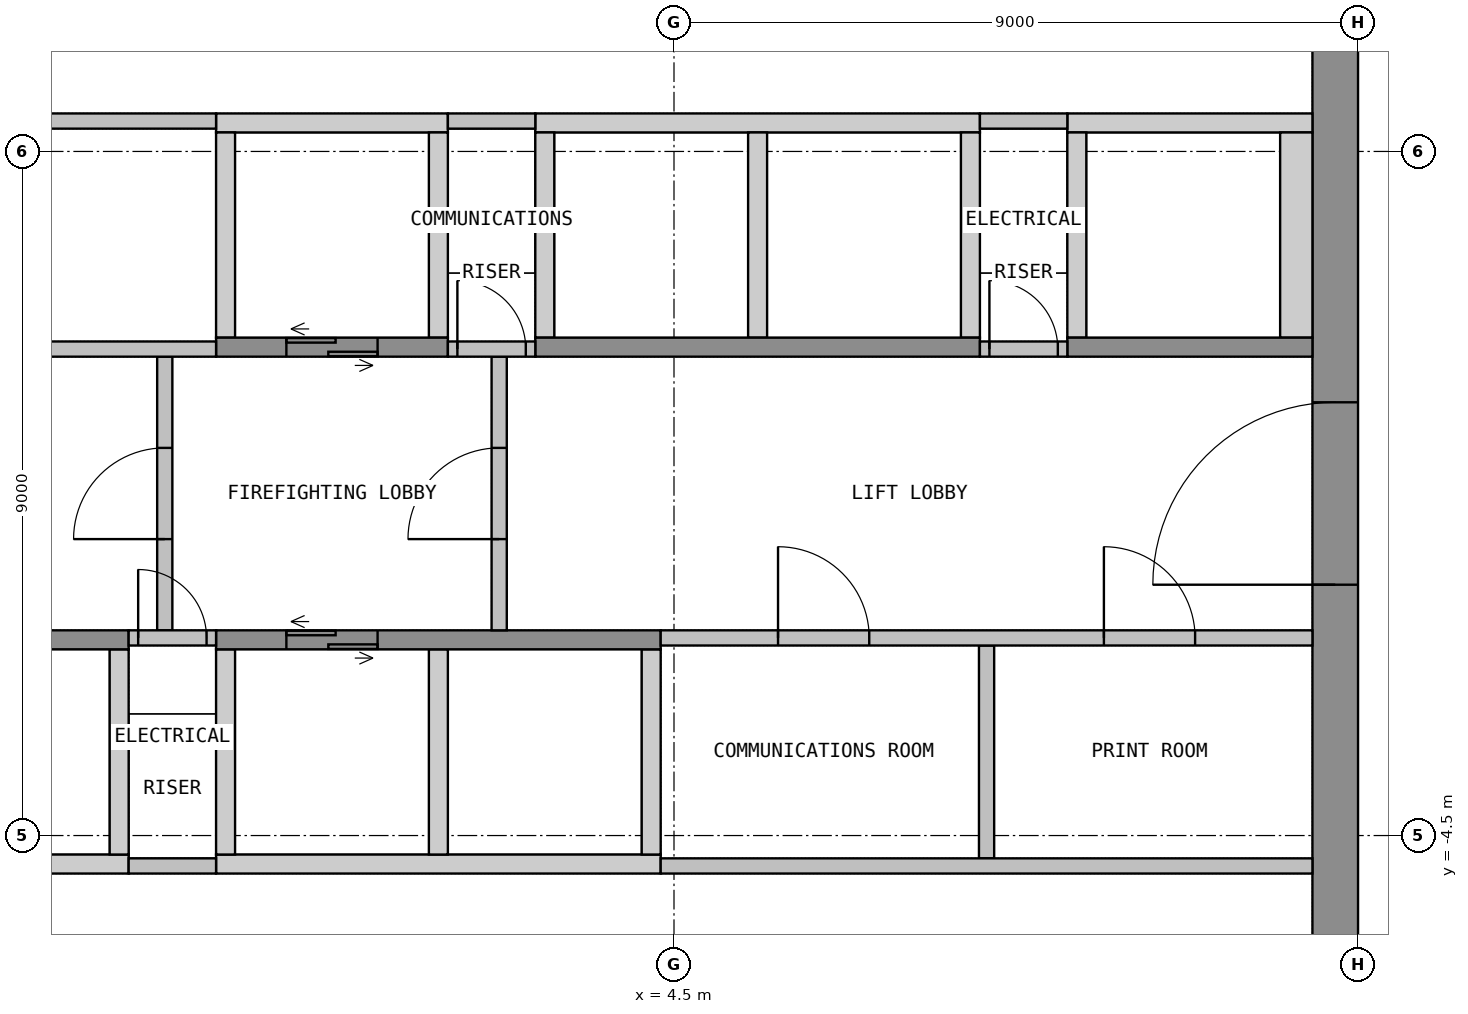
"""IFC4 building model, lengths in metres.
Left out: names, types, materials, properties, quantities, classifications, styles, units other than length and angle.
Written with IfcOpenShell. Run it as: python <this file> out.ifc"""

import sys

from ifc_helpers import new_model, si_unit, direction, frame, frame_2d, origin, place, context, subcontext, project, spatial, polyline, rectangle, outline, extrude, element, fill, save


model = new_model("IFC4")
c1 = context("Model", 3, precision=1e-05, world=origin(), true_north=direction((0.0, 1.0)))
c2 = subcontext(c1, "Body", "Model", "MODEL_VIEW")
j1 = project(units=[si_unit("LENGTHUNIT", "METRE"), si_unit("PLANEANGLEUNIT", "RADIAN")], contexts=[c1])
p1 = place(None, origin())
s1 = spatial("IfcSite", under=j1, at=p1, CompositionType="ELEMENT")
p2 = place(p1, origin())
s2 = spatial("IfcBuilding", under=s1, at=p2, CompositionType="ELEMENT")
p3 = place(p2, frame((0.0, 0.0, 309.9)))
s3 = spatial("IfcBuildingStorey", under=s2, at=p3, CompositionType="ELEMENT", Elevation=309.9)
p4 = place(p3, frame((13.2, -10.65, 0.0), z_axis=(0.0, 0.0, 1.0), x_axis=(0.0, 1.0, 0.0)))
e1 = element("IfcWall", 1, at=p4, inside=s3, PredefinedType="SHEAR", context=c2, shape_type="SweptSolid", body=[
    extrude(rectangle(XDim=21.3, YDim=0.6, at=frame_2d((10.65, 0.0))), origin(), (0.0, 0.0, 1.0), 8.55),
])
p5 = place(p4, frame((9.45, 0.0, 0.0)))
e2 = element("IfcOpeningElement", 2, at=p5, cuts=e1, PredefinedType="OPENING", context=c2, shape_type="SweptSolid", body=[
    extrude(rectangle(XDim=2.4, YDim=2.1, at=frame_2d((1.2, 1.05))), frame((0.0, 0.31, 0.0), z_axis=(0.0, -1.0, 0.0), x_axis=(1.0, 0.0, 0.0)), (0.0, 0.0, 1.0), 0.62),
])
p6 = place(p3, origin())
e3 = element("IfcWall", 3, at=p6, inside=s3, PredefinedType="SHEAR", context=c2, shape_type="SweptSolid", body=[
    extrude(outline(polyline([(-1.525, 4.75), (1.525, 4.75), (1.525, 5.0), (-1.525, 5.0), (-1.525, 4.75)])), origin(), (0.0, 0.0, 1.0), 8.55),
])
p7 = place(p3, origin())
e4 = element("IfcWall", 4, at=p7, inside=s3, PredefinedType="SHEAR", context=c2, shape_type="SweptSolid", body=[
    extrude(outline(polyline([(2.675, 4.75), (8.525, 4.75), (8.525, 5.0), (2.675, 5.0), (2.675, 4.75)])), origin(), (0.0, 0.0, 1.0), 8.55),
])
p8 = place(p3, origin())
e5 = element("IfcWall", 5, at=p8, inside=s3, PredefinedType="SHEAR", context=c2, shape_type="SweptSolid", body=[
    extrude(outline(polyline([(9.675, 4.75), (12.9, 4.75), (12.9, 5.0), (9.675, 5.0), (9.675, 4.75)])), origin(), (0.0, 0.0, 1.0), 8.55),
])
p9 = place(p3, origin())
e6 = element("IfcWall", 6, at=p9, inside=s3, PredefinedType="SHEAR", context=c2, shape_type="SweptSolid", body=[
    extrude(outline(polyline([(-1.525, 2.05), (-1.275, 2.05), (-1.275, 4.75), (-1.525, 4.75), (-1.525, 2.05)])), origin(), (0.0, 0.0, 1.0), 8.55),
])
p10 = place(p3, origin())
e7 = element("IfcWall", 7, at=p10, inside=s3, PredefinedType="SHEAR", context=c2, shape_type="SweptSolid", body=[
    extrude(outline(polyline([(1.275, 2.05), (1.525, 2.05), (1.525, 4.75), (1.275, 4.75), (1.275, 2.05)])), origin(), (0.0, 0.0, 1.0), 8.55),
])
p11 = place(p3, origin())
e8 = element("IfcWall", 8, at=p11, inside=s3, PredefinedType="SHEAR", context=c2, shape_type="SweptSolid", body=[
    extrude(outline(polyline([(2.675, 2.05), (2.925, 2.05), (2.925, 4.75), (2.675, 4.75), (2.675, 2.05)])), origin(), (0.0, 0.0, 1.0), 8.55),
])
p12 = place(p3, origin())
e9 = element("IfcWall", 9, at=p12, inside=s3, PredefinedType="SHEAR", context=c2, shape_type="SweptSolid", body=[
    extrude(outline(polyline([(5.475, 2.05), (5.725, 2.05), (5.725, 4.75), (5.475, 4.75), (5.475, 2.05)])), origin(), (0.0, 0.0, 1.0), 8.55),
])
p13 = place(p3, origin())
e10 = element("IfcWall", 10, at=p13, inside=s3, PredefinedType="SHEAR", context=c2, shape_type="SweptSolid", body=[
    extrude(outline(polyline([(8.275, 2.05), (8.525, 2.05), (8.525, 4.75), (8.275, 4.75), (8.275, 2.05)])), origin(), (0.0, 0.0, 1.0), 8.55),
])
p14 = place(p3, origin())
e11 = element("IfcWall", 11, at=p14, inside=s3, PredefinedType="SHEAR", context=c2, shape_type="SweptSolid", body=[
    extrude(outline(polyline([(9.675, 2.05), (9.925, 2.05), (9.925, 4.75), (9.675, 4.75), (9.675, 2.05)])), origin(), (0.0, 0.0, 1.0), 8.55),
])
p15 = place(p3, origin())
e12 = element("IfcWall", 12, at=p15, inside=s3, PredefinedType="SHEAR", context=c2, shape_type="SweptSolid", body=[
    extrude(outline(polyline([(12.475, 2.05), (12.9, 2.05), (12.9, 4.75), (12.475, 4.75), (12.475, 2.05)])), origin(), (0.0, 0.0, 1.0), 8.55),
])
p16 = place(p3, frame((-1.525, 1.925, 0.0), z_axis=(0.0, 0.0, 1.0), x_axis=(1.0, 0.0, 0.0)))
e13 = element("IfcWall", 13, at=p16, inside=s3, PredefinedType="SHEAR", context=c2, shape_type="SweptSolid", body=[
    extrude(rectangle(XDim=3.05, YDim=0.25, at=frame_2d((1.525, 0.0))), origin(), (0.0, 0.0, 1.0), 8.55),
])
p17 = place(p16, frame((0.925, 0.0, 0.0)))
e14 = element("IfcOpeningElement", 14, at=p17, cuts=e13, PredefinedType="OPENING", context=c2, shape_type="SweptSolid", body=[
    extrude(rectangle(XDim=1.2, YDim=2.1, at=frame_2d((0.6, 1.05))), frame((0.0, 0.135, 0.0), z_axis=(0.0, -1.0, 0.0), x_axis=(1.0, 0.0, 0.0)), (0.0, 0.0, 1.0), 0.27),
])
p18 = place(p3, frame((2.675, 1.925, 0.0), z_axis=(0.0, 0.0, 1.0), x_axis=(1.0, 0.0, 0.0)))
e15 = element("IfcWall", 15, at=p18, inside=s3, PredefinedType="SHEAR", context=c2, shape_type="SweptSolid", body=[
    extrude(rectangle(XDim=5.85, YDim=0.25, at=frame_2d((2.925, 0.0))), origin(), (0.0, 0.0, 1.0), 8.55),
])
p19 = place(p3, frame((9.675, 1.925, 0.0), z_axis=(0.0, 0.0, 1.0), x_axis=(1.0, 0.0, 0.0)))
e16 = element("IfcWall", 16, at=p19, inside=s3, PredefinedType="SHEAR", context=c2, shape_type="SweptSolid", body=[
    extrude(rectangle(XDim=3.225, YDim=0.25, at=frame_2d((1.612, 0.0))), origin(), (0.0, 0.0, 1.0), 8.55),
])
p20 = place(p3, origin())
e17 = element("IfcWall", 17, at=p20, inside=s3, PredefinedType="SHEAR", context=c2, shape_type="SweptSolid", body=[
    extrude(outline(polyline([(-11.325, -5.0), (-2.675, -5.0), (-2.675, -4.75), (-11.325, -4.75), (-11.325, -5.0)])), origin(), (0.0, 0.0, 1.0), 8.55),
])
p21 = place(p3, origin())
e18 = element("IfcWall", 18, at=p21, inside=s3, PredefinedType="SHEAR", context=c2, shape_type="SweptSolid", body=[
    extrude(outline(polyline([(-1.525, -5.0), (4.325, -5.0), (4.325, -4.75), (-1.525, -4.75), (-1.525, -5.0)])), origin(), (0.0, 0.0, 1.0), 8.55),
])
p22 = place(p3, origin())
e19 = element("IfcWall", 19, at=p22, inside=s3, PredefinedType="SHEAR", context=c2, shape_type="SweptSolid", body=[
    extrude(outline(polyline([(-2.925, -4.75), (-2.675, -4.75), (-2.675, -2.05), (-2.925, -2.05), (-2.925, -4.75)])), origin(), (0.0, 0.0, 1.0), 8.55),
])
p23 = place(p3, origin())
e20 = element("IfcWall", 20, at=p23, inside=s3, PredefinedType="SHEAR", context=c2, shape_type="SweptSolid", body=[
    extrude(outline(polyline([(-1.525, -4.75), (-1.275, -4.75), (-1.275, -2.05), (-1.525, -2.05), (-1.525, -4.75)])), origin(), (0.0, 0.0, 1.0), 8.55),
])
p24 = place(p3, origin())
e21 = element("IfcWall", 21, at=p24, inside=s3, PredefinedType="SHEAR", context=c2, shape_type="SweptSolid", body=[
    extrude(outline(polyline([(1.275, -4.75), (1.525, -4.75), (1.525, -2.05), (1.275, -2.05), (1.275, -4.75)])), origin(), (0.0, 0.0, 1.0), 8.55),
])
p25 = place(p3, origin())
e22 = element("IfcWall", 22, at=p25, inside=s3, PredefinedType="SHEAR", context=c2, shape_type="SweptSolid", body=[
    extrude(outline(polyline([(4.075, -4.75), (4.325, -4.75), (4.325, -2.05), (4.075, -2.05), (4.075, -4.75)])), origin(), (0.0, 0.0, 1.0), 8.55),
])
p26 = place(p3, frame((-11.325, -1.925, 0.0), z_axis=(0.0, 0.0, 1.0), x_axis=(1.0, 0.0, 0.0)))
e23 = element("IfcWall", 23, at=p26, inside=s3, PredefinedType="SHEAR", context=c2, shape_type="SweptSolid", body=[
    extrude(rectangle(XDim=8.65, YDim=0.25, at=frame_2d((4.325, 0.0))), origin(), (0.0, 0.0, 1.0), 8.55),
])
p27 = place(p3, frame((-1.525, -1.925, 0.0), z_axis=(0.0, 0.0, 1.0), x_axis=(1.0, 0.0, 0.0)))
e24 = element("IfcWall", 24, at=p27, inside=s3, PredefinedType="SHEAR", context=c2, shape_type="SweptSolid", body=[
    extrude(rectangle(XDim=5.85, YDim=0.25, at=frame_2d((2.925, 0.0))), origin(), (0.0, 0.0, 1.0), 8.55),
])
p28 = place(p27, frame((0.925, 0.0, 0.0)))
e25 = element("IfcOpeningElement", 25, at=p28, cuts=e24, PredefinedType="OPENING", context=c2, shape_type="SweptSolid", body=[
    extrude(rectangle(XDim=1.2, YDim=2.1, at=frame_2d((0.6, 1.05))), frame((0.0, 0.135, 0.0), z_axis=(0.0, -1.0, 0.0), x_axis=(1.0, 0.0, 0.0)), (0.0, 0.0, 1.0), 0.27),
])
p29 = place(p3, frame((-2.2, -1.8, 0.0), z_axis=(0.0, 0.0, 1.0), x_axis=(0.0, 1.0, 0.0)))
e26 = element("IfcWall", 26, at=p29, inside=s3, PredefinedType="PARTITIONING", context=c2, shape_type="SweptSolid", body=[
    extrude(rectangle(XDim=3.6, YDim=0.2, at=frame_2d((1.8, 0.0))), origin(), (0.0, 0.0, 1.0), 8.55),
])
p30 = place(p29, frame((1.2, 0.0, 0.0)))
e27 = element("IfcOpeningElement", 27, at=p30, cuts=e26, PredefinedType="OPENING", context=c2, shape_type="SweptSolid", body=[
    extrude(rectangle(XDim=1.2, YDim=2.1, at=frame_2d((0.6, 1.05))), frame((0.0, 0.11, 0.0), z_axis=(0.0, -1.0, 0.0), x_axis=(1.0, 0.0, 0.0)), (0.0, 0.0, 1.0), 0.22),
])
p31 = place(p3, frame((2.2, -1.8, 0.0), z_axis=(0.0, 0.0, 1.0), x_axis=(0.0, 1.0, 0.0)))
e28 = element("IfcWall", 28, at=p31, inside=s3, PredefinedType="PARTITIONING", context=c2, shape_type="SweptSolid", body=[
    extrude(rectangle(XDim=3.6, YDim=0.2, at=frame_2d((1.8, 0.0))), origin(), (0.0, 0.0, 1.0), 8.55),
])
p32 = place(p31, frame((1.2, 0.0, 0.0)))
e29 = element("IfcOpeningElement", 29, at=p32, cuts=e28, PredefinedType="OPENING", context=c2, shape_type="SweptSolid", body=[
    extrude(rectangle(XDim=1.2, YDim=2.1, at=frame_2d((0.6, 1.05))), frame((0.0, 0.11, 0.0), z_axis=(0.0, -1.0, 0.0), x_axis=(1.0, 0.0, 0.0)), (0.0, 0.0, 1.0), 0.22),
])
p33 = place(p3, frame((-12.9, 1.9, 0.0), z_axis=(0.0, 0.0, 1.0), x_axis=(1.0, 0.0, 0.0)))
e30 = element("IfcWall", 30, at=p33, inside=s3, PredefinedType="PARTITIONING", context=c2, shape_type="SweptSolid", body=[
    extrude(rectangle(XDim=11.375, YDim=0.2, at=frame_2d((5.688, 0.0))), origin(), (0.0, 0.0, 1.0), 8.55),
])
p34 = place(p33, frame((1.256, 0.0, 0.0)))
e31 = element("IfcOpeningElement", 31, at=p34, cuts=e30, PredefinedType="OPENING", context=c2, shape_type="SweptSolid", body=[
    extrude(rectangle(XDim=0.9, YDim=2.1, at=frame_2d((0.45, 1.05))), frame((0.0, 0.11, 0.0), z_axis=(0.0, -1.0, 0.0), x_axis=(1.0, 0.0, 0.0)), (0.0, 0.0, 1.0), 0.22),
])
p35 = place(p33, frame((6.794, 0.0, 0.0)))
e32 = element("IfcOpeningElement", 32, at=p35, cuts=e30, PredefinedType="OPENING", context=c2, shape_type="SweptSolid", body=[
    extrude(rectangle(XDim=1.2, YDim=2.1, at=frame_2d((0.6, 1.05))), frame((0.0, 0.11, 0.0), z_axis=(0.0, -1.0, 0.0), x_axis=(1.0, 0.0, 0.0)), (0.0, 0.0, 1.0), 0.22),
])
p36 = place(p3, frame((-12.9, 4.9, 0.0), z_axis=(0.0, 0.0, 1.0), x_axis=(1.0, 0.0, 0.0)))
e33 = element("IfcWall", 33, at=p36, inside=s3, PredefinedType="PARTITIONING", context=c2, shape_type="SweptSolid", body=[
    extrude(rectangle(XDim=11.375, YDim=0.2, at=frame_2d((5.688, 0.0))), origin(), (0.0, 0.0, 1.0), 8.55),
])
p37 = place(p3, frame((1.525, 1.9, 0.0), z_axis=(0.0, 0.0, 1.0), x_axis=(1.0, 0.0, 0.0)))
e34 = element("IfcWall", 34, at=p37, inside=s3, PredefinedType="PARTITIONING", context=c2, shape_type="SweptSolid", body=[
    extrude(rectangle(XDim=1.15, YDim=0.2, at=frame_2d((0.575, 0.0))), origin(), (0.0, 0.0, 1.0), 8.55),
])
p38 = place(p37, frame((0.125, 0.0, 0.0)))
e35 = element("IfcOpeningElement", 35, at=p38, cuts=e34, PredefinedType="OPENING", context=c2, shape_type="SweptSolid", body=[
    extrude(rectangle(XDim=0.9, YDim=2.1, at=frame_2d((0.45, 1.05))), frame((0.0, 0.11, 0.0), z_axis=(0.0, -1.0, 0.0), x_axis=(1.0, 0.0, 0.0)), (0.0, 0.0, 1.0), 0.22),
])
p39 = place(p3, frame((1.525, 4.9, 0.0), z_axis=(0.0, 0.0, 1.0), x_axis=(1.0, 0.0, 0.0)))
e36 = element("IfcWall", 36, at=p39, inside=s3, PredefinedType="PARTITIONING", context=c2, shape_type="SweptSolid", body=[
    extrude(rectangle(XDim=1.15, YDim=0.2, at=frame_2d((0.575, 0.0))), origin(), (0.0, 0.0, 1.0), 8.55),
])
p40 = place(p3, frame((8.525, 1.9, 0.0), z_axis=(0.0, 0.0, 1.0), x_axis=(1.0, 0.0, 0.0)))
e37 = element("IfcWall", 37, at=p40, inside=s3, PredefinedType="PARTITIONING", context=c2, shape_type="SweptSolid", body=[
    extrude(rectangle(XDim=1.15, YDim=0.2, at=frame_2d((0.575, 0.0))), origin(), (0.0, 0.0, 1.0), 8.55),
])
p41 = place(p40, frame((0.125, 0.0, 0.0)))
e38 = element("IfcOpeningElement", 38, at=p41, cuts=e37, PredefinedType="OPENING", context=c2, shape_type="SweptSolid", body=[
    extrude(rectangle(XDim=0.9, YDim=2.1, at=frame_2d((0.45, 1.05))), frame((0.0, 0.11, 0.0), z_axis=(0.0, -1.0, 0.0), x_axis=(1.0, 0.0, 0.0)), (0.0, 0.0, 1.0), 0.22),
])
p42 = place(p3, frame((8.525, 4.9, 0.0), z_axis=(0.0, 0.0, 1.0), x_axis=(1.0, 0.0, 0.0)))
e39 = element("IfcWall", 39, at=p42, inside=s3, PredefinedType="PARTITIONING", context=c2, shape_type="SweptSolid", body=[
    extrude(rectangle(XDim=1.15, YDim=0.2, at=frame_2d((0.575, 0.0))), origin(), (0.0, 0.0, 1.0), 8.55),
])
p43 = place(p3, frame((-2.675, -1.9, 0.0), z_axis=(0.0, 0.0, 1.0), x_axis=(1.0, 0.0, 0.0)))
e40 = element("IfcWall", 40, at=p43, inside=s3, PredefinedType="PARTITIONING", context=c2, shape_type="SweptSolid", body=[
    extrude(rectangle(XDim=1.15, YDim=0.2, at=frame_2d((0.575, 0.0))), origin(), (0.0, 0.0, 1.0), 8.55),
])
p44 = place(p43, frame((0.125, 0.0, 0.0)))
e41 = element("IfcOpeningElement", 41, at=p44, cuts=e40, PredefinedType="OPENING", context=c2, shape_type="SweptSolid", body=[
    extrude(rectangle(XDim=0.9, YDim=2.1, at=frame_2d((0.45, 1.05))), frame((0.0, 0.11, 0.0), z_axis=(0.0, -1.0, 0.0), x_axis=(1.0, 0.0, 0.0)), (0.0, 0.0, 1.0), 0.22),
])
p45 = place(p3, frame((-2.675, -4.9, 0.0), z_axis=(0.0, 0.0, 1.0), x_axis=(1.0, 0.0, 0.0)))
e42 = element("IfcWall", 42, at=p45, inside=s3, PredefinedType="PARTITIONING", context=c2, shape_type="SweptSolid", body=[
    extrude(rectangle(XDim=1.15, YDim=0.2, at=frame_2d((0.575, 0.0))), origin(), (0.0, 0.0, 1.0), 8.55),
])
p46 = place(p3, frame((8.613, -4.8, 0.0), z_axis=(0.0, 0.0, 1.0), x_axis=(0.0, 1.0, 0.0)))
e43 = element("IfcWall", 43, at=p46, inside=s3, PredefinedType="PARTITIONING", context=c2, shape_type="SweptSolid", body=[
    extrude(rectangle(XDim=2.8, YDim=0.2, at=frame_2d((1.4, 0.0))), origin(), (0.0, 0.0, 1.0), 8.55),
])
p47 = place(p3, frame((4.325, -1.9, 0.0), z_axis=(0.0, 0.0, 1.0), x_axis=(1.0, 0.0, 0.0)))
e44 = element("IfcWall", 44, at=p47, inside=s3, PredefinedType="PARTITIONING", context=c2, shape_type="SweptSolid", body=[
    extrude(rectangle(XDim=8.575, YDim=0.2, at=frame_2d((4.288, 0.0))), origin(), (0.0, 0.0, 1.0), 8.55),
])
p48 = place(p47, frame((1.544, 0.0, 0.0)))
e45 = element("IfcOpeningElement", 45, at=p48, cuts=e44, PredefinedType="OPENING", context=c2, shape_type="SweptSolid", body=[
    extrude(rectangle(XDim=1.2, YDim=2.1, at=frame_2d((0.6, 1.05))), frame((0.0, 0.11, 0.0), z_axis=(0.0, -1.0, 0.0), x_axis=(1.0, 0.0, 0.0)), (0.0, 0.0, 1.0), 0.22),
])
p49 = place(p47, frame((5.831, 0.0, 0.0)))
e46 = element("IfcOpeningElement", 46, at=p49, cuts=e44, PredefinedType="OPENING", context=c2, shape_type="SweptSolid", body=[
    extrude(rectangle(XDim=1.2, YDim=2.1, at=frame_2d((0.6, 1.05))), frame((0.0, 0.11, 0.0), z_axis=(0.0, -1.0, 0.0), x_axis=(1.0, 0.0, 0.0)), (0.0, 0.0, 1.0), 0.22),
])
p50 = place(p3, frame((4.325, -4.9, 0.0), z_axis=(0.0, 0.0, 1.0), x_axis=(1.0, 0.0, 0.0)))
e47 = element("IfcWall", 47, at=p50, inside=s3, PredefinedType="PARTITIONING", context=c2, shape_type="SweptSolid", body=[
    extrude(rectangle(XDim=8.575, YDim=0.2, at=frame_2d((4.288, 0.0))), origin(), (0.0, 0.0, 1.0), 8.55),
])
p51 = place(p5, origin())
e48 = element("IfcDoor", 48, at=p51, inside=s3, OperationType="DOUBLE_DOOR_DOUBLE_SWING", PredefinedType="DOOR", context=c2, shape_type="SweptSolid", body=[
    extrude(rectangle(XDim=2.4, YDim=2.1, at=frame_2d((1.2, 1.05))), frame((0.0, 0.025, 0.0), z_axis=(0.0, -1.0, 0.0), x_axis=(1.0, 0.0, 0.0)), (0.0, 0.0, 1.0), 0.05),
])
fill(e2, e48)
p52 = place(p17, origin())
e49 = element("IfcDoor", 49, at=p52, inside=s3, OperationType="DOUBLE_DOOR_SLIDING", PredefinedType="DOOR", context=c2, shape_type="SweptSolid", body=[
    extrude(rectangle(XDim=1.2, YDim=2.1, at=frame_2d((0.6, 1.05))), frame((0.0, 0.025, 0.0), z_axis=(0.0, -1.0, 0.0), x_axis=(1.0, 0.0, 0.0)), (0.0, 0.0, 1.0), 0.05),
])
fill(e14, e49)
p53 = place(p28, origin())
e50 = element("IfcDoor", 50, at=p53, inside=s3, OperationType="DOUBLE_DOOR_SLIDING", PredefinedType="DOOR", context=c2, shape_type="SweptSolid", body=[
    extrude(rectangle(XDim=1.2, YDim=2.1, at=frame_2d((0.6, 1.05))), frame((0.0, 0.025, 0.0), z_axis=(0.0, -1.0, 0.0), x_axis=(1.0, 0.0, 0.0)), (0.0, 0.0, 1.0), 0.05),
])
fill(e25, e50)
p54 = place(p30, origin())
e51 = element("IfcDoor", 51, at=p54, inside=s3, OperationType="SINGLE_SWING_LEFT", PredefinedType="DOOR", context=c2, shape_type="SweptSolid", body=[
    extrude(rectangle(XDim=1.2, YDim=2.1, at=frame_2d((0.6, 1.05))), frame((0.0, 0.025, 0.0), z_axis=(0.0, -1.0, 0.0), x_axis=(1.0, 0.0, 0.0)), (0.0, 0.0, 1.0), 0.05),
])
fill(e27, e51)
p55 = place(p32, origin())
e52 = element("IfcDoor", 52, at=p55, inside=s3, OperationType="SINGLE_SWING_LEFT", PredefinedType="DOOR", context=c2, shape_type="SweptSolid", body=[
    extrude(rectangle(XDim=1.2, YDim=2.1, at=frame_2d((0.6, 1.05))), frame((0.0, 0.025, 0.0), z_axis=(0.0, -1.0, 0.0), x_axis=(1.0, 0.0, 0.0)), (0.0, 0.0, 1.0), 0.05),
])
fill(e29, e52)
p56 = place(p38, origin())
e53 = element("IfcDoor", 53, at=p56, inside=s3, OperationType="SINGLE_SWING_LEFT", PredefinedType="DOOR", context=c2, shape_type="SweptSolid", body=[
    extrude(rectangle(XDim=0.9, YDim=2.1, at=frame_2d((0.45, 1.05))), frame((0.0, 0.025, 0.0), z_axis=(0.0, -1.0, 0.0), x_axis=(1.0, 0.0, 0.0)), (0.0, 0.0, 1.0), 0.05),
])
fill(e35, e53)
p57 = place(p41, origin())
e54 = element("IfcDoor", 54, at=p57, inside=s3, OperationType="SINGLE_SWING_LEFT", PredefinedType="DOOR", context=c2, shape_type="SweptSolid", body=[
    extrude(rectangle(XDim=0.9, YDim=2.1, at=frame_2d((0.45, 1.05))), frame((0.0, 0.025, 0.0), z_axis=(0.0, -1.0, 0.0), x_axis=(1.0, 0.0, 0.0)), (0.0, 0.0, 1.0), 0.05),
])
fill(e38, e54)
p58 = place(p44, origin())
e55 = element("IfcDoor", 55, at=p58, inside=s3, OperationType="SINGLE_SWING_LEFT", PredefinedType="DOOR", context=c2, shape_type="SweptSolid", body=[
    extrude(rectangle(XDim=0.9, YDim=2.1, at=frame_2d((0.45, 1.05))), frame((0.0, 0.025, 0.0), z_axis=(0.0, -1.0, 0.0), x_axis=(1.0, 0.0, 0.0)), (0.0, 0.0, 1.0), 0.05),
])
fill(e41, e55)
p59 = place(p48, origin())
e56 = element("IfcDoor", 56, at=p59, inside=s3, OperationType="SINGLE_SWING_RIGHT", PredefinedType="DOOR", context=c2, shape_type="SweptSolid", body=[
    extrude(rectangle(XDim=1.2, YDim=2.1, at=frame_2d((0.6, 1.05))), frame((0.0, 0.025, 0.0), z_axis=(0.0, -1.0, 0.0), x_axis=(1.0, 0.0, 0.0)), (0.0, 0.0, 1.0), 0.05),
])
fill(e45, e56)
p60 = place(p49, origin())
e57 = element("IfcDoor", 57, at=p60, inside=s3, OperationType="SINGLE_SWING_RIGHT", PredefinedType="DOOR", context=c2, shape_type="SweptSolid", body=[
    extrude(rectangle(XDim=1.2, YDim=2.1, at=frame_2d((0.6, 1.05))), frame((0.0, 0.025, 0.0), z_axis=(0.0, -1.0, 0.0), x_axis=(1.0, 0.0, 0.0)), (0.0, 0.0, 1.0), 0.05),
])
fill(e46, e57)
save(model, sys.argv[1])
